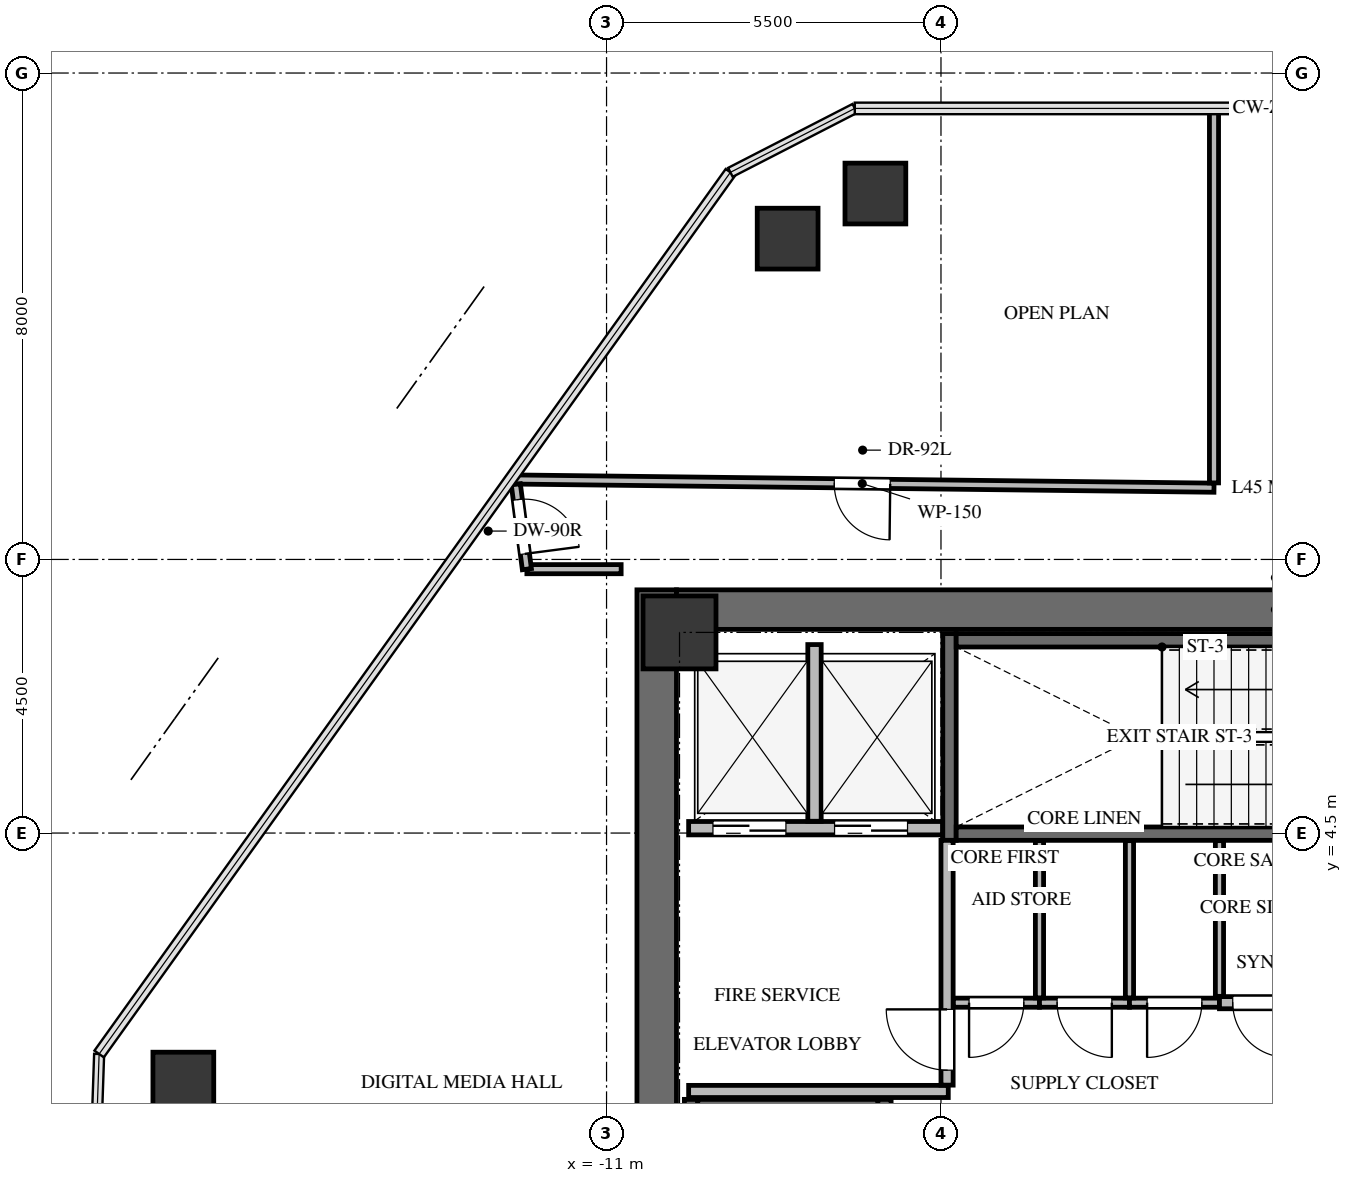
"""IFC4 building model, lengths in metres.
Left out: names, types, materials, properties, quantities, classifications, styles, units other than length and angle.
Written with IfcOpenShell. Run it as: python <this file> out.ifc"""

import sys

from ifc_helpers import new_model, si_unit, direction, frame, frame_2d, origin, origin_2d, place, context, subcontext, project, spatial, rectangle, extrude, source, transform, mapped, element, fill, save


model = new_model("IFC4")
c1 = context("Model", 3, precision=1e-05, world=origin(), true_north=direction((0.0, 1.0)))
c2 = subcontext(c1, "Body", "Model", "MODEL_VIEW")
j1 = project(units=[si_unit("LENGTHUNIT", "METRE"), si_unit("PLANEANGLEUNIT", "RADIAN")], contexts=[c1])
p1 = place(None, origin())
s1 = spatial("IfcSite", under=j1, at=p1, CompositionType="ELEMENT")
p2 = place(p1, origin())
s2 = spatial("IfcBuilding", under=s1, at=p2, CompositionType="ELEMENT")
p3 = place(p2, frame((0.0, 0.0, 167.2)))
s3 = spatial("IfcBuildingStorey", under=s2, at=p3, CompositionType="ELEMENT", Elevation=167.2)
p4 = place(p3, frame((-10.175, -8.5, 0.0), z_axis=(0.0, 0.0, 1.0), x_axis=(0.0, 1.0, 0.0)))
e1 = element("IfcWall", 1, at=p4, inside=s3, PredefinedType="SHEAR", context=c2, shape_type="SweptSolid", body=[
    extrude(rectangle(XDim=17.0, YDim=0.65, at=frame_2d((8.5, 0.0))), origin(), (0.0, 0.0, 1.0), 3.3),
])
p5 = place(p3, frame((-9.85, 8.175, 0.0), z_axis=(0.0, 0.0, 1.0), x_axis=(1.0, 0.0, 0.0)))
e2 = element("IfcWall", 2, at=p5, inside=s3, PredefinedType="SHEAR", context=c2, shape_type="SweptSolid", body=[
    extrude(rectangle(XDim=19.7, YDim=0.65, at=frame_2d((9.85, 0.0))), origin(), (0.0, 0.0, 1.0), 3.3),
])
p6 = place(p3, frame((-6.43, -7.77, -0.24), z_axis=(0.0, 0.0, 1.0), x_axis=(0.0, 1.0, 0.0)))
e3 = element("IfcWall", 3, at=p6, inside=s3, PredefinedType="SHEAR", context=c2, shape_type="SweptSolid", body=[
    extrude(rectangle(XDim=7.89, YDim=0.22, at=frame_2d((3.945, 0.0))), origin(), (0.0, 0.0, 1.0), 3.3),
])
p7 = place(p6, frame((6.32, 0.0, 0.0)))
e4 = element("IfcOpeningElement", 4, at=p7, cuts=e3, PredefinedType="OPENING", context=c2, shape_type="SweptSolid", body=[
    extrude(rectangle(XDim=1.05, YDim=2.15, at=frame_2d((0.525, 1.075))), frame((0.0, 0.12, 0.0), z_axis=(0.0, -1.0, 0.0), x_axis=(1.0, 0.0, 0.0)), (0.0, 0.0, 1.0), 0.24),
])
p8 = place(p3, frame((-9.61, 0.12, -0.24), z_axis=(0.0, 0.0, 1.0), x_axis=(0.0, -1.0, 0.0)))
e5 = element("IfcWall", 5, at=p8, inside=s3, PredefinedType="SHEAR", context=c2, shape_type="SweptSolid", body=[
    extrude(rectangle(XDim=7.89, YDim=0.22, at=frame_2d((3.945, 0.0))), origin(), (0.0, 0.0, 1.0), 3.3),
])
p9 = place(p3, frame((-6.54, 0.01, -0.24), z_axis=(0.0, 0.0, 1.0), x_axis=(-1.0, 0.0, 0.0)))
e6 = element("IfcWall", 6, at=p9, inside=s3, PredefinedType="SHEAR", context=c2, shape_type="SweptSolid", body=[
    extrude(rectangle(XDim=2.96, YDim=0.22, at=frame_2d((1.48, 0.0))), origin(), (0.0, 0.0, 1.0), 3.3),
])
p10 = place(p3, frame((-5.36, 7.78, -0.24), z_axis=(0.0, 0.0, 1.0), x_axis=(0.0, -1.0, 0.0)))
e7 = element("IfcWall", 7, at=p10, inside=s3, PredefinedType="SHEAR", context=c2, shape_type="SweptSolid", body=[
    extrude(rectangle(XDim=3.4, YDim=0.22, at=frame_2d((1.7, 0.0))), origin(), (0.0, 0.0, 1.0), 3.3),
])
p11 = place(p3, frame((-5.25, 4.49, -0.24), z_axis=(0.0, 0.0, 1.0), x_axis=(1.0, 0.0, 0.0)))
e8 = element("IfcWall", 8, at=p11, inside=s3, PredefinedType="SHEAR", context=c2, shape_type="SweptSolid", body=[
    extrude(rectangle(XDim=7.35, YDim=0.22, at=frame_2d((3.675, 0.0))), origin(), (0.0, 0.0, 1.0), 3.3),
])
p12 = place(p11, frame((5.85, 0.0, 0.0)))
e9 = element("IfcOpeningElement", 9, at=p12, cuts=e8, PredefinedType="OPENING", context=c2, shape_type="SweptSolid", body=[
    extrude(rectangle(XDim=1.05, YDim=2.15, at=frame_2d((0.525, 1.075))), frame((0.0, 0.12, 0.0), z_axis=(0.0, -1.0, 0.0), x_axis=(1.0, 0.0, 0.0)), (0.0, 0.0, 1.0), 0.24),
])
p13 = place(p3, frame((2.1, 7.67, -0.24), z_axis=(0.0, 0.0, 1.0), x_axis=(-1.0, 0.0, 0.0)))
e10 = element("IfcWall", 10, at=p13, inside=s3, PredefinedType="SHEAR", context=c2, shape_type="SweptSolid", body=[
    extrude(rectangle(XDim=7.35, YDim=0.22, at=frame_2d((3.675, 0.0))), origin(), (0.0, 0.0, 1.0), 3.3),
])
m1 = source(origin(), c2, "Body", "SweptSolid", [
    extrude(rectangle(XDim=1.2, YDim=1.2, at=origin_2d()), origin(), (0.0, 0.0, 1.0), 3.3),
])
p14 = place(p3, frame((-9.8, 7.8, -0.24), z_axis=(0.0, 0.0, 1.0), x_axis=(1.0, 0.0, 0.0)))
e11 = element("IfcColumn", 11, at=p14, inside=s3, PredefinedType="COLUMN", context=c2, shape_type="MappedRepresentation", body=[
    mapped(m1, transform((0.0, 0.0, 0.0), x_axis=(1.0, 0.0, 0.0), y_axis=(0.0, 1.0, 0.0), z_axis=(0.0, 0.0, 1.0), scale=1.0)),
])
m2 = source(origin(), c2, "Body", "SweptSolid", [
    extrude(rectangle(XDim=1.0, YDim=1.0, at=origin_2d()), origin(), (0.0, 0.0, 1.0), 3.3),
])
for number, where, z_axis, x_axis in (
    (12, (-17.96, 0.396, -0.24), (0.0, 0.0, 1.0), (1.0, 0.0, 0.0)),
    (13, (-8.022, 14.276, -0.24), (0.0, 0.0, 1.0), (1.0, 0.0, 0.0)),
    (14, (-6.579, 15.018, -0.24), (0.0, 0.0, 1.0), (1.0, 0.0, 0.0)),
):
    element("IfcColumn", number, at=place(p3, frame(where, z_axis=z_axis, x_axis=x_axis)), inside=s3, PredefinedType="COLUMN", context=c2, shape_type="MappedRepresentation", body=[
        mapped(m2, transform((0.0, 0.0, 0.0), x_axis=(1.0, 0.0, 0.0), y_axis=(0.0, 1.0, 0.0), z_axis=(0.0, 0.0, 1.0), scale=1.0)),
    ])
p15 = place(p3, frame((-9.65, 4.58, 0.0), z_axis=(0.0, 0.0, 1.0), x_axis=(1.0, 0.0, 0.0)))
e15 = element("IfcWall", 15, at=p15, inside=s3, PredefinedType="SOLIDWALL", context=c2, shape_type="SweptSolid", body=[
    extrude(rectangle(XDim=4.175, YDim=0.22, at=frame_2d((2.087, 0.0))), origin(), (0.0, 0.0, 1.0), 3.045),
])
p16 = place(p15, frame((0.4, 0.0, 0.0)))
e16 = element("IfcOpeningElement", 16, at=p16, cuts=e15, PredefinedType="OPENING", context=c2, shape_type="SweptSolid", body=[
    extrude(rectangle(XDim=1.2, YDim=2.15, at=frame_2d((0.6, 1.075))), frame((0.0, 0.12, 0.0), z_axis=(0.0, -1.0, 0.0), x_axis=(1.0, 0.0, 0.0)), (0.0, 0.0, 1.0), 0.24),
])
p17 = place(p15, frame((2.4, 0.0, 0.0)))
e17 = element("IfcOpeningElement", 17, at=p17, cuts=e15, PredefinedType="OPENING", context=c2, shape_type="SweptSolid", body=[
    extrude(rectangle(XDim=1.2, YDim=2.15, at=frame_2d((0.6, 1.075))), frame((0.0, 0.12, 0.0), z_axis=(0.0, -1.0, 0.0), x_axis=(1.0, 0.0, 0.0)), (0.0, 0.0, 1.0), 0.24),
])
p18 = place(p3, frame((-7.58, 4.694, 0.0), z_axis=(0.0, 0.0, 1.0), x_axis=(0.0, 1.0, 0.0)))
e18 = element("IfcWall", 18, at=p18, inside=s3, PredefinedType="SOLIDWALL", context=c2, shape_type="SweptSolid", body=[
    extrude(rectangle(XDim=2.906, YDim=0.22, at=frame_2d((1.453, 0.0))), origin(), (0.0, 0.0, 1.0), 3.045),
])
p19 = place(p3, frame((-9.65, 0.25, 0.0), z_axis=(0.0, 0.0, 1.0), x_axis=(1.0, 0.0, 0.0)))
e19 = element("IfcWall", 19, at=p19, inside=s3, PredefinedType="SOLIDWALL", context=c2, shape_type="SweptSolid", body=[
    extrude(rectangle(XDim=4.27, YDim=0.2, at=frame_2d((2.135, 0.0))), origin(), (0.0, 0.0, 1.0), 3.045),
])
p20 = place(p3, frame((-5.4, 0.354, 0.0), z_axis=(0.0, 0.0, 1.0), x_axis=(0.0, 1.0, 0.0)))
e20 = element("IfcWall", 20, at=p20, inside=s3, PredefinedType="SOLIDWALL", context=c2, shape_type="SweptSolid", body=[
    extrude(rectangle(XDim=4.026, YDim=0.2, at=frame_2d((2.013, 0.0))), origin(), (0.0, 0.0, 1.0), 3.045),
])
p21 = place(p20, frame((0.246, 0.0, 0.0)))
e21 = element("IfcOpeningElement", 21, at=p21, cuts=e20, PredefinedType="OPENING", context=c2, shape_type="SweptSolid", body=[
    extrude(rectangle(XDim=1.0, YDim=2.15, at=frame_2d((0.5, 1.075))), frame((0.0, 0.11, 0.0), z_axis=(0.0, -1.0, 0.0), x_axis=(1.0, 0.0, 0.0)), (0.0, 0.0, 1.0), 0.22),
])
p22 = place(p3, frame((-3.88, 1.71, 0.0), z_axis=(0.0, 0.0, 1.0), x_axis=(-1.0, 0.0, 0.0)))
e22 = element("IfcWall", 22, at=p22, inside=s3, PredefinedType="PARTITIONING", context=c2, shape_type="SweptSolid", body=[
    extrude(rectangle(XDim=1.416, YDim=0.15, at=frame_2d((0.708, 0.0))), origin(), (0.0, 0.0, 1.0), 3.045),
])
p23 = place(p22, frame((0.258, 0.0, 0.0)))
e23 = element("IfcOpeningElement", 23, at=p23, cuts=e22, PredefinedType="OPENING", context=c2, shape_type="SweptSolid", body=[
    extrude(rectangle(XDim=0.9, YDim=2.05, at=frame_2d((0.45, 1.025))), frame((0.0, 0.085, 0.0), z_axis=(0.0, -1.0, 0.0), x_axis=(1.0, 0.0, 0.0)), (0.0, 0.0, 1.0), 0.17),
])
p24 = place(p3, frame((-2.4, 1.71, 0.0), z_axis=(0.0, 0.0, 1.0), x_axis=(-1.0, 0.0, 0.0)))
e24 = element("IfcWall", 24, at=p24, inside=s3, PredefinedType="PARTITIONING", context=c2, shape_type="SweptSolid", body=[
    extrude(rectangle(XDim=1.48, YDim=0.15, at=frame_2d((0.74, 0.0))), origin(), (0.0, 0.0, 1.0), 3.045),
])
p25 = place(p24, frame((0.29, 0.0, 0.0)))
e25 = element("IfcOpeningElement", 25, at=p25, cuts=e24, PredefinedType="OPENING", context=c2, shape_type="SweptSolid", body=[
    extrude(rectangle(XDim=0.9, YDim=2.05, at=frame_2d((0.45, 1.025))), frame((0.0, 0.085, 0.0), z_axis=(0.0, -1.0, 0.0), x_axis=(1.0, 0.0, 0.0)), (0.0, 0.0, 1.0), 0.17),
])
p26 = place(p3, frame((-0.92, 1.71, 0.0), z_axis=(0.0, 0.0, 1.0), x_axis=(-1.0, 0.0, 0.0)))
e26 = element("IfcWall", 26, at=p26, inside=s3, PredefinedType="PARTITIONING", context=c2, shape_type="SweptSolid", body=[
    extrude(rectangle(XDim=1.48, YDim=0.15, at=frame_2d((0.74, 0.0))), origin(), (0.0, 0.0, 1.0), 3.045),
])
p27 = place(p26, frame((0.29, 0.0, 0.0)))
e27 = element("IfcOpeningElement", 27, at=p27, cuts=e26, PredefinedType="OPENING", context=c2, shape_type="SweptSolid", body=[
    extrude(rectangle(XDim=0.9, YDim=2.05, at=frame_2d((0.45, 1.025))), frame((0.0, 0.085, 0.0), z_axis=(0.0, -1.0, 0.0), x_axis=(1.0, 0.0, 0.0)), (0.0, 0.0, 1.0), 0.17),
])
p28 = place(p3, frame((0.416, 1.71, 0.0), z_axis=(0.0, 0.0, 1.0), x_axis=(-1.0, 0.0, 0.0)))
e28 = element("IfcWall", 28, at=p28, inside=s3, PredefinedType="SOLIDWALL", context=c2, shape_type="SweptSolid", body=[
    extrude(rectangle(XDim=1.336, YDim=0.2, at=frame_2d((0.668, 0.0))), origin(), (0.0, 0.0, 1.0), 3.045),
])
p29 = place(p28, frame((0.218, 0.0, 0.0)))
e29 = element("IfcOpeningElement", 29, at=p29, cuts=e28, PredefinedType="OPENING", context=c2, shape_type="SweptSolid", body=[
    extrude(rectangle(XDim=0.9, YDim=2.05, at=frame_2d((0.45, 1.025))), frame((0.0, 0.11, 0.0), z_axis=(0.0, -1.0, 0.0), x_axis=(1.0, 0.0, 0.0)), (0.0, 0.0, 1.0), 0.22),
])
p30 = place(p3, frame((-1.01, 10.18, 0.0), z_axis=(0.0, 0.0, 1.0), x_axis=(-0.999931176304, 0.011732120664, 0.0)))
e30 = element("IfcWall", 30, at=p30, inside=s3, PredefinedType="PARTITIONING", context=c2, shape_type="SweptSolid", body=[
    extrude(rectangle(XDim=11.57, YDim=0.15, at=frame_2d((5.785, 0.0))), origin(), (0.0, 0.0, 1.0), 2.242),
])
p31 = place(p30, frame((5.325, 0.0, 0.0)))
e31 = element("IfcOpeningElement", 31, at=p31, cuts=e30, PredefinedType="OPENING", context=c2, shape_type="SweptSolid", body=[
    extrude(rectangle(XDim=0.92, YDim=2.1, at=frame_2d((0.46, 1.05))), frame((0.0, 0.085, 0.0), z_axis=(0.0, -1.0, 0.0), x_axis=(1.0, 0.0, 0.0)), (0.0, 0.0, 1.0), 0.17),
])
p32 = place(p3, frame((-1.01, 16.418, 0.0), z_axis=(0.0, 0.0, 1.0), x_axis=(0.0, -1.0, 0.0)))
e32 = element("IfcWall", 32, at=p32, inside=s3, PredefinedType="PARTITIONING", context=c2, shape_type="SweptSolid", body=[
    extrude(rectangle(XDim=6.159, YDim=0.15, at=frame_2d((3.08, 0.0))), origin(), (0.0, 0.0, 1.0), 2.399),
])
p33 = place(p3, frame((-12.31, 8.84, 0.0), z_axis=(0.0, 0.0, 1.0), x_axis=(1.0, 0.0, 0.0)))
e33 = element("IfcWall", 33, at=p33, inside=s3, PredefinedType="PARTITIONING", context=c2, shape_type="SweptSolid", body=[
    extrude(rectangle(XDim=1.55, YDim=0.15, at=frame_2d((0.775, 0.0))), origin(), (0.0, 0.0, 1.0), 2.399),
])
p34 = place(p3, frame((-12.492, 10.236, 0.0), z_axis=(0.0, 0.0, 1.0), x_axis=(0.129413346452, -0.991590735011, 0.0)))
e34 = element("IfcWall", 34, at=p34, inside=s3, PredefinedType="PARTITIONING", context=c2, shape_type="SweptSolid", body=[
    extrude(rectangle(XDim=1.407, YDim=0.15, at=frame_2d((0.704, 0.0))), origin(), (0.0, 0.0, 1.0), 3.045),
])
p35 = place(p34, frame((0.254, 0.0, 0.0)))
e35 = element("IfcOpeningElement", 35, at=p35, cuts=e34, PredefinedType="OPENING", context=c2, shape_type="SweptSolid", body=[
    extrude(rectangle(XDim=0.9, YDim=2.05, at=frame_2d((0.45, 1.025))), frame((0.0, 0.085, 0.0), z_axis=(0.0, -1.0, 0.0), x_axis=(1.0, 0.0, 0.0)), (0.0, 0.0, 1.0), 0.17),
])
for number, where, z_axis, x_axis in (
    (36, (-3.88, 4.375, 0.0), (0.0, 0.0, 1.0), (0.0, -1.0, 0.0)),
    (37, (-2.4, 4.375, 0.0), (0.0, 0.0, 1.0), (0.0, -1.0, 0.0)),
):
    element("IfcWall", number, at=place(p3, frame(where, z_axis=z_axis, x_axis=x_axis)), inside=s3, PredefinedType="PARTITIONING", context=c2, shape_type="SweptSolid", body=[
        extrude(rectangle(XDim=2.586, YDim=0.135, at=frame_2d((1.293, 0.0))), origin(), (0.0, 0.0, 1.0), 3.045),
    ])
p36 = place(p3, frame((-0.92, 4.375, 0.0), z_axis=(0.0, 0.0, 1.0), x_axis=(0.0, -1.0, 0.0)))
e38 = element("IfcWall", 38, at=p36, inside=s3, PredefinedType="PARTITIONING", context=c2, shape_type="SweptSolid", body=[
    extrude(rectangle(XDim=2.561, YDim=0.135, at=frame_2d((1.281, 0.0))), origin(), (0.0, 0.0, 1.0), 3.045),
])
m3 = source(origin(), c2, "Body", "SweptSolid", [
    extrude(rectangle(XDim=1.2, YDim=2.15, at=frame_2d((0.6, 1.075))), frame((0.0, 0.025, 0.0), z_axis=(0.0, -1.0, 0.0), x_axis=(1.0, 0.0, 0.0)), (0.0, 0.0, 1.0), 0.05),
])
p37 = place(p16, origin())
e39 = element("IfcDoor", 39, at=p37, inside=s3, OperationType="DOUBLE_DOOR_SLIDING", PredefinedType="DOOR", context=c2, shape_type="MappedRepresentation", body=[
    mapped(m3, transform((0.0, 0.0, 0.0), x_axis=(1.0, 0.0, 0.0), y_axis=(0.0, 1.0, 0.0), z_axis=(0.0, 0.0, 1.0), scale=1.0)),
])
fill(e16, e39)
p38 = place(p17, origin())
e40 = element("IfcDoor", 40, at=p38, inside=s3, OperationType="DOUBLE_DOOR_SLIDING", PredefinedType="DOOR", context=c2, shape_type="MappedRepresentation", body=[
    mapped(m3, transform((0.0, 0.0, 0.0), x_axis=(1.0, 0.0, 0.0), y_axis=(0.0, 1.0, 0.0), z_axis=(0.0, 0.0, 1.0), scale=1.0)),
])
fill(e17, e40)
m4 = source(origin(), c2, "Body", "SweptSolid", [
    extrude(rectangle(XDim=1.0, YDim=2.15, at=frame_2d((0.5, 1.075))), frame((0.0, 0.025, 0.0), z_axis=(0.0, -1.0, 0.0), x_axis=(1.0, 0.0, 0.0)), (0.0, 0.0, 1.0), 0.05),
])
p39 = place(p21, origin())
e41 = element("IfcDoor", 41, at=p39, inside=s3, OperationType="SINGLE_SWING_RIGHT", PredefinedType="DOOR", context=c2, shape_type="MappedRepresentation", body=[
    mapped(m4, transform((0.0, 0.0, 0.0), x_axis=(1.0, 0.0, 0.0), y_axis=(0.0, 1.0, 0.0), z_axis=(0.0, 0.0, 1.0), scale=1.0)),
])
fill(e21, e41)
m5 = source(origin(), c2, "Body", "SweptSolid", [
    extrude(rectangle(XDim=0.9, YDim=2.05, at=frame_2d((0.45, 1.025))), frame((0.0, 0.025, 0.0), z_axis=(0.0, -1.0, 0.0), x_axis=(1.0, 0.0, 0.0)), (0.0, 0.0, 1.0), 0.05),
])
p40 = place(p23, origin())
e42 = element("IfcDoor", 42, at=p40, inside=s3, OperationType="SINGLE_SWING_RIGHT", PredefinedType="DOOR", context=c2, shape_type="MappedRepresentation", body=[
    mapped(m5, transform((0.0, 0.0, 0.0), x_axis=(1.0, 0.0, 0.0), y_axis=(0.0, 1.0, 0.0), z_axis=(0.0, 0.0, 1.0), scale=1.0)),
])
fill(e23, e42)
m6 = source(origin(), c2, "Body", "SweptSolid", [
    extrude(rectangle(XDim=0.9, YDim=2.05, at=frame_2d((0.45, 1.025))), frame((0.0, 0.025, 0.0), z_axis=(0.0, -1.0, 0.0), x_axis=(1.0, 0.0, 0.0)), (0.0, 0.0, 1.0), 0.05),
])
p41 = place(p25, origin())
e43 = element("IfcDoor", 43, at=p41, inside=s3, OperationType="SINGLE_SWING_LEFT", PredefinedType="DOOR", context=c2, shape_type="MappedRepresentation", body=[
    mapped(m6, transform((0.0, 0.0, 0.0), x_axis=(1.0, 0.0, 0.0), y_axis=(0.0, 1.0, 0.0), z_axis=(0.0, 0.0, 1.0), scale=1.0)),
])
fill(e25, e43)
p42 = place(p27, origin())
e44 = element("IfcDoor", 44, at=p42, inside=s3, OperationType="SINGLE_SWING_RIGHT", PredefinedType="DOOR", context=c2, shape_type="MappedRepresentation", body=[
    mapped(m5, transform((0.0, 0.0, 0.0), x_axis=(1.0, 0.0, 0.0), y_axis=(0.0, 1.0, 0.0), z_axis=(0.0, 0.0, 1.0), scale=1.0)),
])
fill(e27, e44)
p43 = place(p29, origin())
e45 = element("IfcDoor", 45, at=p43, inside=s3, OperationType="SINGLE_SWING_LEFT", PredefinedType="DOOR", context=c2, shape_type="MappedRepresentation", body=[
    mapped(m6, transform((0.0, 0.0, 0.0), x_axis=(1.0, 0.0, 0.0), y_axis=(0.0, 1.0, 0.0), z_axis=(0.0, 0.0, 1.0), scale=1.0)),
])
fill(e29, e45)
m7 = source(origin(), c2, "Body", "SweptSolid", [
    extrude(rectangle(XDim=0.92, YDim=2.1, at=frame_2d((0.46, 1.05))), frame((0.0, 0.025, 0.0), z_axis=(0.0, -1.0, 0.0), x_axis=(1.0, 0.0, 0.0)), (0.0, 0.0, 1.0), 0.05),
])
p44 = place(p31, origin())
e46 = element("IfcDoor", 46, at=p44, inside=s3, OperationType="SINGLE_SWING_LEFT", PredefinedType="DOOR", context=c2, shape_type="MappedRepresentation", body=[
    mapped(m7, transform((0.0, 0.0, 0.0), x_axis=(1.0, 0.0, 0.0), y_axis=(0.0, 1.0, 0.0), z_axis=(0.0, 0.0, 1.0), scale=1.0)),
])
fill(e31, e46)
m8 = source(origin(), c2, "Body", "SweptSolid", [
    extrude(rectangle(XDim=0.9, YDim=2.05, at=frame_2d((0.45, 1.025))), frame((0.0, 0.025, 0.0), z_axis=(0.0, -1.0, 0.0), x_axis=(1.0, 0.0, 0.0)), (0.0, 0.0, 1.0), 0.05),
])
p45 = place(p35, origin())
e47 = element("IfcDoor", 47, at=p45, inside=s3, OperationType="SINGLE_SWING_RIGHT", PredefinedType="DOOR", context=c2, shape_type="MappedRepresentation", body=[
    mapped(m8, transform((0.0, 0.0, 0.0), x_axis=(1.0, 0.0, 0.0), y_axis=(0.0, 1.0, 0.0), z_axis=(0.0, 0.0, 1.0), scale=1.0)),
])
fill(e35, e47)
save(model, sys.argv[1])
